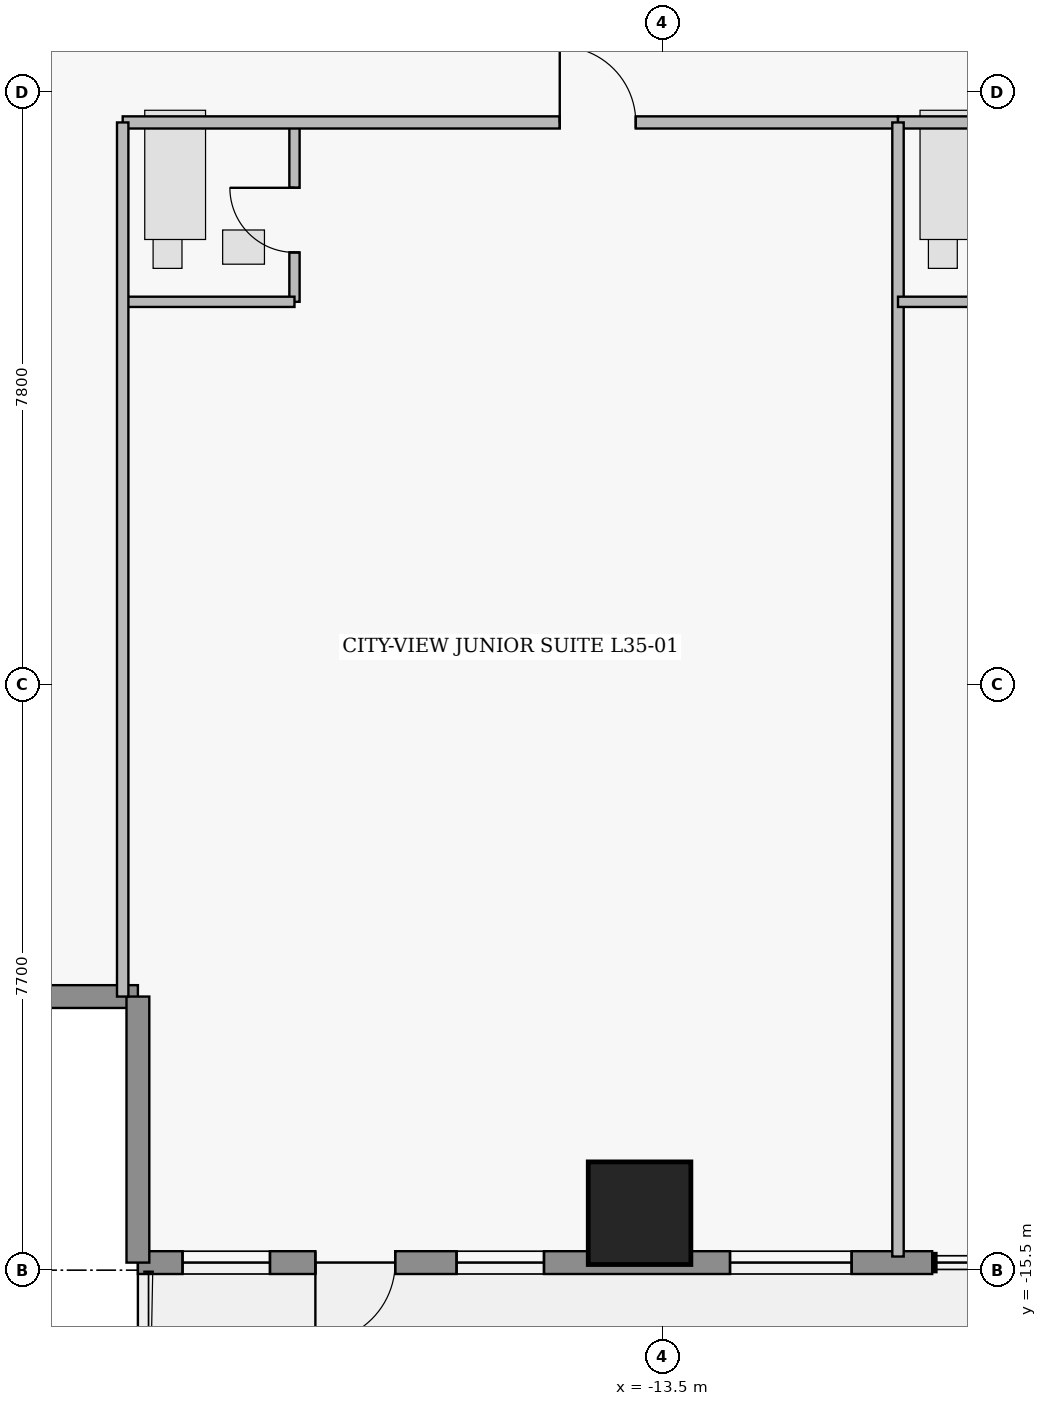
"""IFC4 building model, lengths in metres.
Left out: names, types, materials, properties, quantities, classifications, styles, units other than length and angle.
Written with IfcOpenShell. Run it as: python <this file> out.ifc"""

import sys

from ifc_helpers import new_model, si_unit, direction, frame, frame_2d, origin, origin_2d, place, context, subcontext, project, spatial, rectangle, extrude, element, fill, save


model = new_model("IFC4")
c1 = context("Model", 3, precision=1e-05, world=origin(), true_north=direction((0.0, 1.0)))
c2 = subcontext(c1, "Body", "Model", "MODEL_VIEW")
j1 = project(units=[si_unit("LENGTHUNIT", "METRE"), si_unit("PLANEANGLEUNIT", "RADIAN")], contexts=[c1])
p1 = place(None, origin())
s1 = spatial("IfcSite", under=j1, at=p1, CompositionType="ELEMENT")
p2 = place(p1, origin())
s2 = spatial("IfcBuilding", under=s1, at=p2, CompositionType="ELEMENT")
p3 = place(p2, frame((0.0, 0.0, 139.45)))
s3 = spatial("IfcBuildingStorey", under=s2, at=p3, CompositionType="ELEMENT", Elevation=139.45)
p4 = place(p3, frame((-13.8, -14.75, 0.0), z_axis=(0.0, 0.0, 1.0), x_axis=(1.0, 0.0, 0.0)))
e1 = element("IfcColumn", 1, at=p4, inside=s3, PredefinedType="COLUMN", context=c2, shape_type="SweptSolid", body=[
    extrude(rectangle(XDim=1.35, YDim=1.35, at=origin_2d()), origin(), (0.0, 0.0, 1.0), 3.65),
])
p5 = place(p3, frame((-20.4, -11.9, 0.0), z_axis=(0.0, 0.0, 1.0), x_axis=(-1.0, 0.0, 0.0)))
e2 = element("IfcWall", 2, at=p5, inside=s3, PredefinedType="STANDARD", context=c2, shape_type="SweptSolid", body=[
    extrude(rectangle(XDim=3.5, YDim=0.3, at=frame_2d((1.75, 0.0))), origin(), (0.0, 0.0, 1.0), 3.43),
])
p6 = place(p3, frame((-9.95, -15.4, 0.0), z_axis=(0.0, 0.0, 1.0), x_axis=(-1.0, 0.0, 0.0)))
e3 = element("IfcWall", 3, at=p6, inside=s3, PredefinedType="STANDARD", context=c2, shape_type="SweptSolid", body=[
    extrude(rectangle(XDim=10.45, YDim=0.3, at=frame_2d((5.225, 0.0))), origin(), (0.0, 0.0, 1.0), 3.43),
])
p7 = place(p6, frame((7.065, 0.0, 0.0)))
e4 = element("IfcOpeningElement", 4, at=p7, cuts=e3, PredefinedType="OPENING", context=c2, shape_type="SweptSolid", body=[
    extrude(rectangle(XDim=1.05, YDim=2.2, at=frame_2d((0.525, 1.1))), frame((0.0, 0.16, 0.0), z_axis=(0.0, -1.0, 0.0), x_axis=(1.0, 0.0, 0.0)), (0.0, 0.0, 1.0), 0.32),
])
p8 = place(p6, frame((1.06, 0.0, 0.85)))
e5 = element("IfcOpeningElement", 5, at=p8, cuts=e3, PredefinedType="OPENING", context=c2, shape_type="SweptSolid", body=[
    extrude(rectangle(XDim=1.6, YDim=1.8, at=frame_2d((0.8, 0.9))), frame((0.0, 0.16, 0.0), z_axis=(0.0, -1.0, 0.0), x_axis=(1.0, 0.0, 0.0)), (0.0, 0.0, 1.0), 0.32),
])
p9 = place(p6, frame((5.107, 0.0, 0.95)))
e6 = element("IfcOpeningElement", 6, at=p9, cuts=e3, PredefinedType="OPENING", context=c2, shape_type="SweptSolid", body=[
    extrude(rectangle(XDim=1.15, YDim=1.55, at=frame_2d((0.575, 0.775))), frame((0.0, 0.16, 0.0), z_axis=(0.0, -1.0, 0.0), x_axis=(1.0, 0.0, 0.0)), (0.0, 0.0, 1.0), 0.32),
])
p10 = place(p6, frame((8.712, 0.0, 0.95)))
e7 = element("IfcOpeningElement", 7, at=p10, cuts=e3, PredefinedType="OPENING", context=c2, shape_type="SweptSolid", body=[
    extrude(rectangle(XDim=1.15, YDim=1.55, at=frame_2d((0.575, 0.775))), frame((0.0, 0.16, 0.0), z_axis=(0.0, -1.0, 0.0), x_axis=(1.0, 0.0, 0.0)), (0.0, 0.0, 1.0), 0.32),
])
p11 = place(p3, frame((-20.4, -15.4, 0.0), z_axis=(0.0, 0.0, 1.0), x_axis=(0.0, 1.0, 0.0)))
e8 = element("IfcWall", 8, at=p11, inside=s3, PredefinedType="STANDARD", context=c2, shape_type="SweptSolid", body=[
    extrude(rectangle(XDim=3.5, YDim=0.3, at=frame_2d((1.75, 0.0))), origin(), (0.0, 0.0, 1.0), 3.43),
])
p12 = place(p3, frame((-18.34, -2.76, 0.0), z_axis=(0.0, 0.0, 1.0), x_axis=(0.0, 1.0, 0.0)))
e9 = element("IfcWall", 9, at=p12, inside=s3, PredefinedType="PLUMBINGWALL", context=c2, shape_type="SweptSolid", body=[
    extrude(rectangle(XDim=2.36, YDim=0.135, at=frame_2d((1.18, 0.0))), origin(), (0.0, 0.0, 1.0), 3.43),
])
p13 = place(p12, frame((0.65, 0.0, 0.0)))
e10 = element("IfcOpeningElement", 10, at=p13, cuts=e9, PredefinedType="OPENING", context=c2, shape_type="SweptSolid", body=[
    extrude(rectangle(XDim=0.85, YDim=2.1, at=frame_2d((0.425, 1.05))), frame((0.0, 0.077, 0.0), z_axis=(0.0, -1.0, 0.0), x_axis=(1.0, 0.0, 0.0)), (0.0, 0.0, 1.0), 0.155),
])
p14 = place(p3, frame((-20.6, -0.4, 0.0), z_axis=(0.0, 0.0, 1.0), x_axis=(1.0, 0.0, 0.0)))
e11 = element("IfcWall", 11, at=p14, inside=s3, PredefinedType="PARTITIONING", context=c2, shape_type="SweptSolid", body=[
    extrude(rectangle(XDim=10.2, YDim=0.16, at=frame_2d((5.1, 0.0))), origin(), (0.0, 0.0, 1.0), 3.43),
])
p15 = place(p14, frame((5.75, 0.0, 0.0)))
e12 = element("IfcOpeningElement", 12, at=p15, cuts=e11, PredefinedType="OPENING", context=c2, shape_type="SweptSolid", body=[
    extrude(rectangle(XDim=1.0, YDim=2.15, at=frame_2d((0.5, 1.075))), frame((0.0, 0.09, 0.0), z_axis=(0.0, -1.0, 0.0), x_axis=(1.0, 0.0, 0.0)), (0.0, 0.0, 1.0), 0.18),
])
p16 = place(p3, frame((-10.4, -0.4, 0.0), z_axis=(0.0, 0.0, 1.0), x_axis=(1.0, 0.0, 0.0)))
e13 = element("IfcWall", 13, at=p16, inside=s3, PredefinedType="PARTITIONING", context=c2, shape_type="SweptSolid", body=[
    extrude(rectangle(XDim=9.6, YDim=0.16, at=frame_2d((4.8, 0.0))), origin(), (0.0, 0.0, 1.0), 3.43),
])
p17 = place(p16, frame((5.45, 0.0, 0.0)))
e14 = element("IfcOpeningElement", 14, at=p17, cuts=e13, PredefinedType="OPENING", context=c2, shape_type="SweptSolid", body=[
    extrude(rectangle(XDim=1.0, YDim=2.15, at=frame_2d((0.5, 1.075))), frame((0.0, 0.09, 0.0), z_axis=(0.0, -1.0, 0.0), x_axis=(1.0, 0.0, 0.0)), (0.0, 0.0, 1.0), 0.18),
])
p18 = place(p3, frame((-20.6, -2.76, 0.0), z_axis=(0.0, 0.0, 1.0), x_axis=(1.0, 0.0, 0.0)))
e15 = element("IfcWall", 15, at=p18, inside=s3, PredefinedType="PLUMBINGWALL", context=c2, shape_type="SweptSolid", body=[
    extrude(rectangle(XDim=2.26, YDim=0.135, at=frame_2d((1.13, 0.0))), origin(), (0.0, 0.0, 1.0), 3.43),
])
p19 = place(p3, frame((-20.6, -11.9, 0.0), z_axis=(0.0, 0.0, 1.0), x_axis=(0.0, 1.0, 0.0)))
e16 = element("IfcWall", 16, at=p19, inside=s3, PredefinedType="PARTITIONING", context=c2, shape_type="SweptSolid", body=[
    extrude(rectangle(XDim=11.5, YDim=0.15, at=frame_2d((5.75, 0.0))), origin(), (0.0, 0.0, 1.0), 3.43),
])
p20 = place(p3, frame((-10.4, -15.32, 0.0), z_axis=(0.0, 0.0, 1.0), x_axis=(0.0, 1.0, 0.0)))
e17 = element("IfcWall", 17, at=p20, inside=s3, PredefinedType="PARTITIONING", context=c2, shape_type="SweptSolid", body=[
    extrude(rectangle(XDim=14.92, YDim=0.15, at=frame_2d((7.46, 0.0))), origin(), (0.0, 0.0, 1.0), 3.43),
])
p21 = place(p3, frame((-10.4, -2.76, 0.0), z_axis=(0.0, 0.0, 1.0), x_axis=(1.0, 0.0, 0.0)))
e18 = element("IfcWall", 18, at=p21, inside=s3, PredefinedType="PLUMBINGWALL", context=c2, shape_type="SweptSolid", body=[
    extrude(rectangle(XDim=2.26, YDim=0.135, at=frame_2d((1.13, 0.0))), origin(), (0.0, 0.0, 1.0), 3.43),
])
p22 = place(p7, origin())
e19 = element("IfcDoor", 19, at=p22, inside=s3, OperationType="SINGLE_SWING_RIGHT", PredefinedType="DOOR", context=c2, shape_type="SweptSolid", body=[
    extrude(rectangle(XDim=1.05, YDim=2.2, at=frame_2d((0.525, 1.1))), frame((0.0, 0.025, 0.0), z_axis=(0.0, -1.0, 0.0), x_axis=(1.0, 0.0, 0.0)), (0.0, 0.0, 1.0), 0.05),
])
fill(e4, e19)
p23 = place(p8, origin())
e20 = element("IfcWindow", 20, at=p23, inside=s3, PartitioningType="SINGLE_PANEL", PredefinedType="WINDOW", context=c2, shape_type="SweptSolid", body=[
    extrude(rectangle(XDim=1.6, YDim=1.8, at=frame_2d((0.8, 0.9))), frame((0.0, 0.03, 0.0), z_axis=(0.0, -1.0, 0.0), x_axis=(1.0, 0.0, 0.0)), (0.0, 0.0, 1.0), 0.06),
])
fill(e5, e20)
p24 = place(p9, origin())
e21 = element("IfcWindow", 21, at=p24, inside=s3, PartitioningType="SINGLE_PANEL", PredefinedType="WINDOW", context=c2, shape_type="SweptSolid", body=[
    extrude(rectangle(XDim=1.15, YDim=1.55, at=frame_2d((0.575, 0.775))), frame((0.0, 0.03, 0.0), z_axis=(0.0, -1.0, 0.0), x_axis=(1.0, 0.0, 0.0)), (0.0, 0.0, 1.0), 0.06),
])
fill(e6, e21)
p25 = place(p10, origin())
e22 = element("IfcWindow", 22, at=p25, inside=s3, PartitioningType="SINGLE_PANEL", PredefinedType="WINDOW", context=c2, shape_type="SweptSolid", body=[
    extrude(rectangle(XDim=1.15, YDim=1.55, at=frame_2d((0.575, 0.775))), frame((0.0, 0.03, 0.0), z_axis=(0.0, -1.0, 0.0), x_axis=(1.0, 0.0, 0.0)), (0.0, 0.0, 1.0), 0.06),
])
fill(e7, e22)
p26 = place(p13, origin())
e23 = element("IfcDoor", 23, at=p26, inside=s3, OperationType="SINGLE_SWING_RIGHT", PredefinedType="DOOR", context=c2, shape_type="SweptSolid", body=[
    extrude(rectangle(XDim=0.85, YDim=2.1, at=frame_2d((0.425, 1.05))), frame((0.0, 0.025, 0.0), z_axis=(0.0, -1.0, 0.0), x_axis=(1.0, 0.0, 0.0)), (0.0, 0.0, 1.0), 0.05),
])
fill(e10, e23)
p27 = place(p15, origin())
e24 = element("IfcDoor", 24, at=p27, inside=s3, OperationType="SINGLE_SWING_LEFT", PredefinedType="DOOR", context=c2, shape_type="SweptSolid", body=[
    extrude(rectangle(XDim=1.0, YDim=2.15, at=frame_2d((0.5, 1.075))), frame((0.0, 0.025, 0.0), z_axis=(0.0, -1.0, 0.0), x_axis=(1.0, 0.0, 0.0)), (0.0, 0.0, 1.0), 0.05),
])
fill(e12, e24)
save(model, sys.argv[1])
